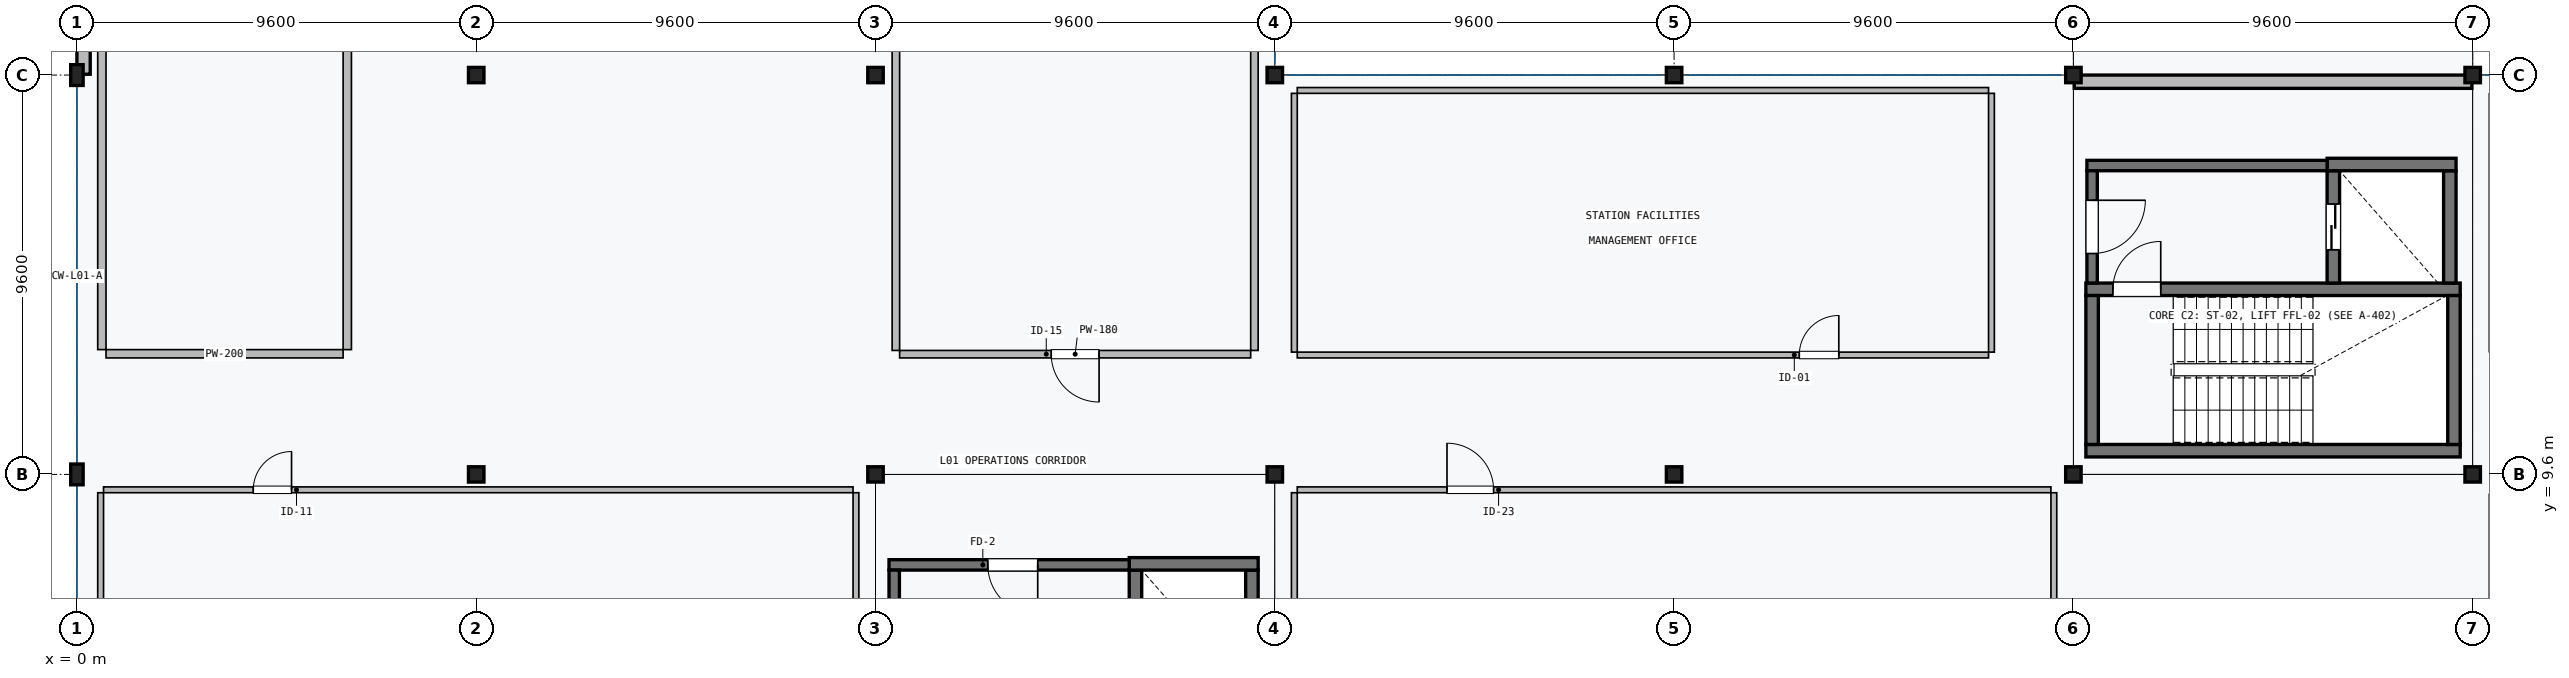
"""IFC4 building model, lengths in metres.
Left out: names, types, materials, properties, quantities, classifications, styles, units other than length and angle.
Written with IfcOpenShell. Run it as: python <this file> out.ifc"""

import sys

from ifc_helpers import new_model, si_unit, direction, frame, frame_2d, origin, origin_2d, place, context, subcontext, project, spatial, rectangle, i_section, extrude, element, fill, save


model = new_model("IFC4")
c1 = context("Model", 3, precision=1e-05, world=origin(), true_north=direction((0.0, 1.0)))
c2 = subcontext(c1, "Body", "Model", "MODEL_VIEW")
j1 = project(units=[si_unit("LENGTHUNIT", "METRE"), si_unit("PLANEANGLEUNIT", "RADIAN")], contexts=[c1])
p1 = place(None, origin())
s1 = spatial("IfcSite", under=j1, at=p1, CompositionType="ELEMENT")
p2 = place(p1, origin())
s2 = spatial("IfcBuilding", under=s1, at=p2, CompositionType="ELEMENT")
p3 = place(p2, frame((0.0, 0.0, 6.0)))
s3 = spatial("IfcBuildingStorey", under=s2, at=p3, CompositionType="ELEMENT", Elevation=6.0)
for number, where, z_axis, x_axis in (
    (1, (0.0, 9.6, 0.0), (0.0, 0.0, 1.0), (1.0, 0.0, 0.0)),
    (2, (0.0, 19.2, 0.0), (0.0, 0.0, 1.0), (1.0, 0.0, 0.0)),
):
    element("IfcColumn", number, at=place(p3, frame(where, z_axis=z_axis, x_axis=x_axis)), inside=s3, PredefinedType="COLUMN", context=c2, shape_type="SweptSolid", body=[
        extrude(i_section(OverallWidth=0.3, OverallDepth=0.5, WebThickness=0.014, FlangeThickness=0.028, FilletRadius=0.027, at=origin_2d()), origin(), (0.0, 0.0, 1.0), 4.25),
    ])
for number, where, z_axis, x_axis in (
    (3, (9.6, 9.6, 0.0), (0.0, 0.0, 1.0), (1.0, 0.0, 0.0)),
    (4, (9.6, 19.2, 0.0), (0.0, 0.0, 1.0), (1.0, 0.0, 0.0)),
    (5, (19.2, 9.6, 0.0), (0.0, 0.0, 1.0), (1.0, 0.0, 0.0)),
    (6, (19.2, 19.2, 0.0), (0.0, 0.0, 1.0), (1.0, 0.0, 0.0)),
    (7, (28.8, 9.6, 0.0), (0.0, 0.0, 1.0), (1.0, 0.0, 0.0)),
    (8, (28.8, 19.2, 0.0), (0.0, 0.0, 1.0), (1.0, 0.0, 0.0)),
    (9, (38.4, 9.6, 0.0), (0.0, 0.0, 1.0), (1.0, 0.0, 0.0)),
    (10, (38.4, 19.2, 0.0), (0.0, 0.0, 1.0), (1.0, 0.0, 0.0)),
    (11, (48.0, 9.6, 0.0), (0.0, 0.0, 1.0), (1.0, 0.0, 0.0)),
    (12, (48.0, 19.2, 0.0), (0.0, 0.0, 1.0), (1.0, 0.0, 0.0)),
    (13, (57.6, 9.6, 0.0), (0.0, 0.0, 1.0), (1.0, 0.0, 0.0)),
    (14, (57.6, 19.2, 0.0), (0.0, 0.0, 1.0), (1.0, 0.0, 0.0)),
):
    element("IfcColumn", number, at=place(p3, frame(where, z_axis=z_axis, x_axis=x_axis)), inside=s3, PredefinedType="COLUMN", context=c2, shape_type="SweptSolid", body=[
        extrude(i_section(OverallWidth=0.373, OverallDepth=0.368, WebThickness=0.014, FlangeThickness=0.024, FilletRadius=0.015, at=origin_2d()), origin(), (0.0, 0.0, 1.0), 4.25),
    ])
p4 = place(p3, frame((48.3, 10.17, 0.0), z_axis=(0.0, 0.0, 1.0), x_axis=(1.0, 0.0, 0.0)))
e15 = element("IfcWall", 15, at=p4, inside=s3, PredefinedType="SHEAR", context=c2, shape_type="SweptSolid", body=[
    extrude(rectangle(XDim=9.0, YDim=0.3, at=frame_2d((4.5, 0.0))), origin(), (0.0, 0.0, 1.0), 4.25),
])
p5 = place(p3, frame((57.3, 14.05, 0.0), z_axis=(0.0, 0.0, 1.0), x_axis=(-1.0, 0.0, 0.0)))
e16 = element("IfcWall", 16, at=p5, inside=s3, PredefinedType="SHEAR", context=c2, shape_type="SweptSolid", body=[
    extrude(rectangle(XDim=9.0, YDim=0.3, at=frame_2d((4.5, 0.0))), origin(), (0.0, 0.0, 1.0), 4.25),
])
p6 = place(p5, frame((7.2, 0.0, 0.0)))
e17 = element("IfcOpeningElement", 17, at=p6, cuts=e16, PredefinedType="OPENING", context=c2, shape_type="SweptSolid", body=[
    extrude(rectangle(XDim=1.15, YDim=2.15, at=frame_2d((0.575, 1.075))), frame((0.0, 0.16, 0.0), z_axis=(0.0, -1.0, 0.0), x_axis=(1.0, 0.0, 0.0)), (0.0, 0.0, 1.0), 0.32),
])
for number, where, z_axis, x_axis in (
    (18, (48.45, 10.32, 0.0), (0.0, 0.0, 1.0), (0.0, 1.0, 0.0)),
    (19, (57.15, 13.9, 0.0), (0.0, 0.0, 1.0), (0.0, -1.0, 0.0)),
):
    element("IfcWall", number, at=place(p3, frame(where, z_axis=z_axis, x_axis=x_axis)), inside=s3, PredefinedType="SHEAR", context=c2, shape_type="SweptSolid", body=[
        extrude(rectangle(XDim=3.58, YDim=0.3, at=frame_2d((1.79, 0.0))), origin(), (0.0, 0.0, 1.0), 4.25),
    ])
p7 = place(p3, frame((54.25, 16.9, 0.0), z_axis=(0.0, 0.0, 1.0), x_axis=(0.0, -1.0, 0.0)))
e20 = element("IfcWall", 20, at=p7, inside=s3, PredefinedType="SHEAR", context=c2, shape_type="SweptSolid", body=[
    extrude(rectangle(XDim=2.7, YDim=0.3, at=frame_2d((1.35, 0.0))), origin(), (0.0, 0.0, 1.0), 4.25),
])
p8 = place(p7, frame((0.8, 0.0, 0.0)))
e21 = element("IfcOpeningElement", 21, at=p8, cuts=e20, PredefinedType="OPENING", context=c2, shape_type="SweptSolid", body=[
    extrude(rectangle(XDim=1.1, YDim=2.1, at=frame_2d((0.55, 1.05))), frame((0.0, 0.16, 0.0), z_axis=(0.0, -1.0, 0.0), x_axis=(1.0, 0.0, 0.0)), (0.0, 0.0, 1.0), 0.32),
])
p9 = place(p3, frame((57.05, 14.2, 0.0), z_axis=(0.0, 0.0, 1.0), x_axis=(0.0, 1.0, 0.0)))
e22 = element("IfcWall", 22, at=p9, inside=s3, PredefinedType="SHEAR", context=c2, shape_type="SweptSolid", body=[
    extrude(rectangle(XDim=2.7, YDim=0.3, at=frame_2d((1.35, 0.0))), origin(), (0.0, 0.0, 1.0), 4.25),
])
p10 = place(p3, frame((54.1, 17.05, 0.0), z_axis=(0.0, 0.0, 1.0), x_axis=(1.0, 0.0, 0.0)))
e23 = element("IfcWall", 23, at=p10, inside=s3, PredefinedType="SHEAR", context=c2, shape_type="SweptSolid", body=[
    extrude(rectangle(XDim=3.1, YDim=0.3, at=frame_2d((1.55, 0.0))), origin(), (0.0, 0.0, 1.0), 4.25),
])
p11 = place(p3, frame((54.1, 17.025, 0.0), z_axis=(0.0, 0.0, 1.0), x_axis=(-1.0, 0.0, 0.0)))
e24 = element("IfcWall", 24, at=p11, inside=s3, PredefinedType="SHEAR", context=c2, shape_type="SweptSolid", body=[
    extrude(rectangle(XDim=5.775, YDim=0.25, at=frame_2d((2.888, 0.0))), origin(), (0.0, 0.0, 1.0), 4.25),
])
p12 = place(p3, frame((48.45, 14.2, 0.0), z_axis=(0.0, 0.0, 1.0), x_axis=(0.0, 1.0, 0.0)))
e25 = element("IfcWall", 25, at=p12, inside=s3, PredefinedType="SHEAR", context=c2, shape_type="SweptSolid", body=[
    extrude(rectangle(XDim=2.7, YDim=0.25, at=frame_2d((1.35, 0.0))), origin(), (0.0, 0.0, 1.0), 4.25),
])
p13 = place(p12, frame((0.71, 0.0, 0.0)))
e26 = element("IfcOpeningElement", 26, at=p13, cuts=e25, PredefinedType="OPENING", context=c2, shape_type="SweptSolid", body=[
    extrude(rectangle(XDim=1.28, YDim=2.2, at=frame_2d((0.64, 1.1))), frame((0.0, 0.135, 0.0), z_axis=(0.0, -1.0, 0.0), x_axis=(1.0, 0.0, 0.0)), (0.0, 0.0, 1.0), 0.27),
])
p14 = place(p3, frame((25.45, 7.3, 0.0), z_axis=(0.0, 0.0, 1.0), x_axis=(0.0, -1.0, 0.0)))
e27 = element("IfcWall", 27, at=p14, inside=s3, PredefinedType="SHEAR", context=c2, shape_type="SweptSolid", body=[
    extrude(rectangle(XDim=2.7, YDim=0.3, at=frame_2d((1.35, 0.0))), origin(), (0.0, 0.0, 1.0), 4.25),
])
p15 = place(p14, frame((0.775, 0.0, 0.0)))
e28 = element("IfcOpeningElement", 28, at=p15, cuts=e27, PredefinedType="OPENING", context=c2, shape_type="SweptSolid", body=[
    extrude(rectangle(XDim=1.15, YDim=2.1, at=frame_2d((0.575, 1.05))), frame((0.0, 0.16, 0.0), z_axis=(0.0, -1.0, 0.0), x_axis=(1.0, 0.0, 0.0)), (0.0, 0.0, 1.0), 0.32),
])
p16 = place(p3, frame((28.25, 4.6, 0.0), z_axis=(0.0, 0.0, 1.0), x_axis=(0.0, 1.0, 0.0)))
e29 = element("IfcWall", 29, at=p16, inside=s3, PredefinedType="SHEAR", context=c2, shape_type="SweptSolid", body=[
    extrude(rectangle(XDim=2.7, YDim=0.3, at=frame_2d((1.35, 0.0))), origin(), (0.0, 0.0, 1.0), 4.25),
])
p17 = place(p3, frame((25.3, 7.45, 0.0), z_axis=(0.0, 0.0, 1.0), x_axis=(1.0, 0.0, 0.0)))
e30 = element("IfcWall", 30, at=p17, inside=s3, PredefinedType="SHEAR", context=c2, shape_type="SweptSolid", body=[
    extrude(rectangle(XDim=3.1, YDim=0.3, at=frame_2d((1.55, 0.0))), origin(), (0.0, 0.0, 1.0), 4.25),
])
p18 = place(p3, frame((25.3, 7.425, 0.0), z_axis=(0.0, 0.0, 1.0), x_axis=(-1.0, 0.0, 0.0)))
e31 = element("IfcWall", 31, at=p18, inside=s3, PredefinedType="SHEAR", context=c2, shape_type="SweptSolid", body=[
    extrude(rectangle(XDim=5.775, YDim=0.25, at=frame_2d((2.888, 0.0))), origin(), (0.0, 0.0, 1.0), 4.25),
])
p19 = place(p18, frame((2.2, 0.0, 0.0)))
e32 = element("IfcOpeningElement", 32, at=p19, cuts=e31, PredefinedType="OPENING", context=c2, shape_type="SweptSolid", body=[
    extrude(rectangle(XDim=1.2, YDim=2.15, at=frame_2d((0.6, 1.075))), frame((0.0, 0.135, 0.0), z_axis=(0.0, -1.0, 0.0), x_axis=(1.0, 0.0, 0.0)), (0.0, 0.0, 1.0), 0.27),
])
p20 = place(p3, frame((19.65, 4.6, 0.0), z_axis=(0.0, 0.0, 1.0), x_axis=(0.0, 1.0, 0.0)))
e33 = element("IfcWall", 33, at=p20, inside=s3, PredefinedType="SHEAR", context=c2, shape_type="SweptSolid", body=[
    extrude(rectangle(XDim=2.7, YDim=0.25, at=frame_2d((1.35, 0.0))), origin(), (0.0, 0.0, 1.0), 4.25),
])
p21 = place(p3, frame((0.16, 19.22, 0.0), z_axis=(0.0, 0.0, 1.0), x_axis=(0.0, 1.0, 0.0)))
e34 = element("IfcWall", 34, at=p21, inside=s3, PredefinedType="SOLIDWALL", context=c2, shape_type="SweptSolid", body=[
    extrude(rectangle(XDim=9.56, YDim=0.32, at=frame_2d((4.78, 0.0))), origin(), (0.0, 0.0, 1.0), 3.717),
])
p22 = place(p3, frame((48.02, 19.04, 0.0), z_axis=(0.0, 0.0, 1.0), x_axis=(1.0, 0.0, 0.0)))
e35 = element("IfcWall", 35, at=p22, inside=s3, PredefinedType="SOLIDWALL", context=c2, shape_type="SweptSolid", body=[
    extrude(rectangle(XDim=9.56, YDim=0.32, at=frame_2d((4.78, 0.0))), origin(), (0.0, 0.0, 1.0), 3.9),
])
p23 = place(p3, frame((6.4, 12.5, 0.0), z_axis=(0.0, 0.0, 1.0), x_axis=(-1.0, 0.0, 0.0)))
e36 = element("IfcWall", 36, at=p23, inside=s3, PredefinedType="PARTITIONING", context=c2, shape_type="SweptSolid", body=[
    extrude(rectangle(XDim=5.7, YDim=0.2, at=frame_2d((2.85, 0.0))), origin(), (0.0, 0.0, 1.0), 3.89),
])
p24 = place(p3, frame((0.6, 12.6, 0.0), z_axis=(0.0, 0.0, 1.0), x_axis=(0.0, 1.0, 0.0)))
e37 = element("IfcWall", 37, at=p24, inside=s3, PredefinedType="PARTITIONING", context=c2, shape_type="SweptSolid", body=[
    extrude(rectangle(XDim=25.2, YDim=0.2, at=frame_2d((12.6, 0.0))), origin(), (0.0, 0.0, 1.0), 3.556),
])
p25 = place(p3, frame((6.5, 37.8, 0.0), z_axis=(0.0, 0.0, 1.0), x_axis=(0.0, -1.0, 0.0)))
e38 = element("IfcWall", 38, at=p25, inside=s3, PredefinedType="PARTITIONING", context=c2, shape_type="SweptSolid", body=[
    extrude(rectangle(XDim=25.2, YDim=0.2, at=frame_2d((12.6, 0.0))), origin(), (0.0, 0.0, 1.0), 3.556),
])
p26 = place(p25, frame((3.6, 0.0, 0.0)))
e39 = element("IfcOpeningElement", 39, at=p26, cuts=e38, PredefinedType="OPENING", context=c2, shape_type="SweptSolid", body=[
    extrude(rectangle(XDim=1.6, YDim=2.3, at=frame_2d((0.8, 1.15))), frame((0.0, 0.11, 0.0), z_axis=(0.0, -1.0, 0.0), x_axis=(1.0, 0.0, 0.0)), (0.0, 0.0, 1.0), 0.22),
])
p27 = place(p3, frame((28.22, 12.49, 0.0), z_axis=(0.0, 0.0, 1.0), x_axis=(-1.0, 0.0, 0.0)))
e40 = element("IfcWall", 40, at=p27, inside=s3, PredefinedType="PARTITIONING", context=c2, shape_type="SweptSolid", body=[
    extrude(rectangle(XDim=8.44, YDim=0.18, at=frame_2d((4.22, 0.0))), origin(), (0.0, 0.0, 1.0), 3.89),
])
p28 = place(p27, frame((3.645, 0.0, 0.0)))
e41 = element("IfcOpeningElement", 41, at=p28, cuts=e40, PredefinedType="OPENING", context=c2, shape_type="SweptSolid", body=[
    extrude(rectangle(XDim=1.15, YDim=2.2, at=frame_2d((0.575, 1.1))), frame((0.0, 0.1, 0.0), z_axis=(0.0, -1.0, 0.0), x_axis=(1.0, 0.0, 0.0)), (0.0, 0.0, 1.0), 0.2),
])
for number, where, z_axis, x_axis in (
    (42, (19.69, 12.58, 0.0), (0.0, 0.0, 1.0), (0.0, 1.0, 0.0)),
    (43, (28.31, 37.82, 0.0), (0.0, 0.0, 1.0), (0.0, -1.0, 0.0)),
):
    element("IfcWall", number, at=place(p3, frame(where, z_axis=z_axis, x_axis=x_axis)), inside=s3, PredefinedType="PARTITIONING", context=c2, shape_type="SweptSolid", body=[
        extrude(rectangle(XDim=25.24, YDim=0.18, at=frame_2d((12.62, 0.0))), origin(), (0.0, 0.0, 1.0), 3.556),
    ])
p29 = place(p3, frame((0.64, 9.23, 0.0), z_axis=(0.0, 0.0, 1.0), x_axis=(1.0, 0.0, 0.0)))
e44 = element("IfcWall", 44, at=p29, inside=s3, PredefinedType="PARTITIONING", context=c2, shape_type="SweptSolid", body=[
    extrude(rectangle(XDim=18.02, YDim=0.14, at=frame_2d((9.01, 0.0))), origin(), (0.0, 0.0, 1.0), 3.707),
])
p30 = place(p29, frame((3.6, 0.0, 0.0)))
e45 = element("IfcOpeningElement", 45, at=p30, cuts=e44, PredefinedType="OPENING", context=c2, shape_type="SweptSolid", body=[
    extrude(rectangle(XDim=0.92, YDim=2.15, at=frame_2d((0.46, 1.075))), frame((0.0, 0.08, 0.0), z_axis=(0.0, -1.0, 0.0), x_axis=(1.0, 0.0, 0.0)), (0.0, 0.0, 1.0), 0.16),
])
for number, where, z_axis, x_axis in (
    (46, (0.57, 0.64, 0.0), (0.0, 0.0, 1.0), (0.0, 1.0, 0.0)),
    (47, (18.73, 9.16, 0.0), (0.0, 0.0, 1.0), (0.0, -1.0, 0.0)),
):
    element("IfcWall", number, at=place(p3, frame(where, z_axis=z_axis, x_axis=x_axis)), inside=s3, PredefinedType="PARTITIONING", context=c2, shape_type="SweptSolid", body=[
        extrude(rectangle(XDim=8.52, YDim=0.14, at=frame_2d((4.26, 0.0))), origin(), (0.0, 0.0, 1.0), 3.89),
    ])
p31 = place(p3, frame((29.34, 9.23, 0.0), z_axis=(0.0, 0.0, 1.0), x_axis=(1.0, 0.0, 0.0)))
e48 = element("IfcWall", 48, at=p31, inside=s3, PredefinedType="PARTITIONING", context=c2, shape_type="SweptSolid", body=[
    extrude(rectangle(XDim=18.12, YDim=0.14, at=frame_2d((9.06, 0.0))), origin(), (0.0, 0.0, 1.0), 3.707),
])
p32 = place(p31, frame((3.6, 0.0, 0.0)))
e49 = element("IfcOpeningElement", 49, at=p32, cuts=e48, PredefinedType="OPENING", context=c2, shape_type="SweptSolid", body=[
    extrude(rectangle(XDim=1.12, YDim=2.2, at=frame_2d((0.56, 1.1))), frame((0.0, 0.08, 0.0), z_axis=(0.0, -1.0, 0.0), x_axis=(1.0, 0.0, 0.0)), (0.0, 0.0, 1.0), 0.16),
])
for number, where, z_axis, x_axis in (
    (50, (29.27, 0.64, 0.0), (0.0, 0.0, 1.0), (0.0, 1.0, 0.0)),
    (51, (47.53, 9.16, 0.0), (0.0, 0.0, 1.0), (0.0, -1.0, 0.0)),
):
    element("IfcWall", number, at=place(p3, frame(where, z_axis=z_axis, x_axis=x_axis)), inside=s3, PredefinedType="PARTITIONING", context=c2, shape_type="SweptSolid", body=[
        extrude(rectangle(XDim=8.52, YDim=0.14, at=frame_2d((4.26, 0.0))), origin(), (0.0, 0.0, 1.0), 3.89),
    ])
p33 = place(p3, frame((45.96, 12.47, 0.0), z_axis=(0.0, 0.0, 1.0), x_axis=(-1.0, 0.0, 0.0)))
e52 = element("IfcWall", 52, at=p33, inside=s3, PredefinedType="PARTITIONING", context=c2, shape_type="SweptSolid", body=[
    extrude(rectangle(XDim=16.62, YDim=0.14, at=frame_2d((8.31, 0.0))), origin(), (0.0, 0.0, 1.0), 3.707),
])
p34 = place(p33, frame((3.6, 0.0, 0.0)))
e53 = element("IfcOpeningElement", 53, at=p34, cuts=e52, PredefinedType="OPENING", context=c2, shape_type="SweptSolid", body=[
    extrude(rectangle(XDim=0.95, YDim=2.15, at=frame_2d((0.475, 1.075))), frame((0.0, 0.08, 0.0), z_axis=(0.0, -1.0, 0.0), x_axis=(1.0, 0.0, 0.0)), (0.0, 0.0, 1.0), 0.16),
])
p35 = place(p3, frame((29.34, 18.83, 0.0), z_axis=(0.0, 0.0, 1.0), x_axis=(1.0, 0.0, 0.0)))
e54 = element("IfcWall", 54, at=p35, inside=s3, PredefinedType="PARTITIONING", context=c2, shape_type="SweptSolid", body=[
    extrude(rectangle(XDim=16.62, YDim=0.14, at=frame_2d((8.31, 0.0))), origin(), (0.0, 0.0, 1.0), 3.707),
])
for number, where, z_axis, x_axis in (
    (55, (29.27, 12.54, 0.0), (0.0, 0.0, 1.0), (0.0, 1.0, 0.0)),
    (56, (46.03, 18.76, 0.0), (0.0, 0.0, 1.0), (0.0, -1.0, 0.0)),
):
    element("IfcWall", number, at=place(p3, frame(where, z_axis=z_axis, x_axis=x_axis)), inside=s3, PredefinedType="PARTITIONING", context=c2, shape_type="SweptSolid", body=[
        extrude(rectangle(XDim=6.22, YDim=0.14, at=frame_2d((3.11, 0.0))), origin(), (0.0, 0.0, 1.0), 3.89),
    ])
p36 = place(p6, frame((1.15, 0.0, 0.0), z_axis=(0.0, 0.0, 1.0), x_axis=(-1.0, 0.0, 0.0)))
e57 = element("IfcDoor", 57, at=p36, inside=s3, OperationType="SINGLE_SWING_LEFT", PredefinedType="DOOR", context=c2, shape_type="SweptSolid", body=[
    extrude(rectangle(XDim=1.15, YDim=2.15, at=frame_2d((0.575, 1.075))), frame((0.0, 0.025, 0.0), z_axis=(0.0, -1.0, 0.0), x_axis=(1.0, 0.0, 0.0)), (0.0, 0.0, 1.0), 0.05),
])
fill(e17, e57)
p37 = place(p8, frame((1.1, 0.0, 0.0), z_axis=(0.0, 0.0, 1.0), x_axis=(-1.0, 0.0, 0.0)))
e58 = element("IfcDoor", 58, at=p37, inside=s3, OperationType="DOUBLE_DOOR_SLIDING", PredefinedType="DOOR", context=c2, shape_type="SweptSolid", body=[
    extrude(rectangle(XDim=1.1, YDim=2.1, at=frame_2d((0.55, 1.05))), frame((0.0, 0.025, 0.0), z_axis=(0.0, -1.0, 0.0), x_axis=(1.0, 0.0, 0.0)), (0.0, 0.0, 1.0), 0.05),
])
fill(e21, e58)
p38 = place(p13, frame((1.28, 0.0, 0.0), z_axis=(0.0, 0.0, 1.0), x_axis=(-1.0, 0.0, 0.0)))
e59 = element("IfcDoor", 59, at=p38, inside=s3, OperationType="SINGLE_SWING_RIGHT", PredefinedType="DOOR", context=c2, shape_type="SweptSolid", body=[
    extrude(rectangle(XDim=1.28, YDim=2.2, at=frame_2d((0.64, 1.1))), frame((0.0, 0.025, 0.0), z_axis=(0.0, -1.0, 0.0), x_axis=(1.0, 0.0, 0.0)), (0.0, 0.0, 1.0), 0.05),
])
fill(e26, e59)
p39 = place(p19, origin())
e60 = element("IfcDoor", 60, at=p39, inside=s3, OperationType="SINGLE_SWING_LEFT", PredefinedType="DOOR", context=c2, shape_type="SweptSolid", body=[
    extrude(rectangle(XDim=1.2, YDim=2.15, at=frame_2d((0.6, 1.075))), frame((0.0, 0.025, 0.0), z_axis=(0.0, -1.0, 0.0), x_axis=(1.0, 0.0, 0.0)), (0.0, 0.0, 1.0), 0.05),
])
fill(e32, e60)
p40 = place(p28, origin())
e61 = element("IfcDoor", 61, at=p40, inside=s3, OperationType="SINGLE_SWING_LEFT", PredefinedType="DOOR", context=c2, shape_type="SweptSolid", body=[
    extrude(rectangle(XDim=1.15, YDim=2.2, at=frame_2d((0.575, 1.1))), frame((0.0, 0.025, 0.0), z_axis=(0.0, -1.0, 0.0), x_axis=(1.0, 0.0, 0.0)), (0.0, 0.0, 1.0), 0.05),
])
fill(e41, e61)
p41 = place(p30, origin())
e62 = element("IfcDoor", 62, at=p41, inside=s3, OperationType="SINGLE_SWING_RIGHT", PredefinedType="DOOR", context=c2, shape_type="SweptSolid", body=[
    extrude(rectangle(XDim=0.92, YDim=2.15, at=frame_2d((0.46, 1.075))), frame((0.0, 0.025, 0.0), z_axis=(0.0, -1.0, 0.0), x_axis=(1.0, 0.0, 0.0)), (0.0, 0.0, 1.0), 0.05),
])
fill(e45, e62)
p42 = place(p32, origin())
e63 = element("IfcDoor", 63, at=p42, inside=s3, OperationType="SINGLE_SWING_LEFT", PredefinedType="DOOR", context=c2, shape_type="SweptSolid", body=[
    extrude(rectangle(XDim=1.12, YDim=2.2, at=frame_2d((0.56, 1.1))), frame((0.0, 0.025, 0.0), z_axis=(0.0, -1.0, 0.0), x_axis=(1.0, 0.0, 0.0)), (0.0, 0.0, 1.0), 0.05),
])
fill(e49, e63)
p43 = place(p34, frame((0.95, 0.0, 0.0), z_axis=(0.0, 0.0, 1.0), x_axis=(-1.0, 0.0, 0.0)))
e64 = element("IfcDoor", 64, at=p43, inside=s3, OperationType="SINGLE_SWING_LEFT", PredefinedType="DOOR", context=c2, shape_type="SweptSolid", body=[
    extrude(rectangle(XDim=0.95, YDim=2.15, at=frame_2d((0.475, 1.075))), frame((0.0, 0.025, 0.0), z_axis=(0.0, -1.0, 0.0), x_axis=(1.0, 0.0, 0.0)), (0.0, 0.0, 1.0), 0.05),
])
fill(e53, e64)
save(model, sys.argv[1])
